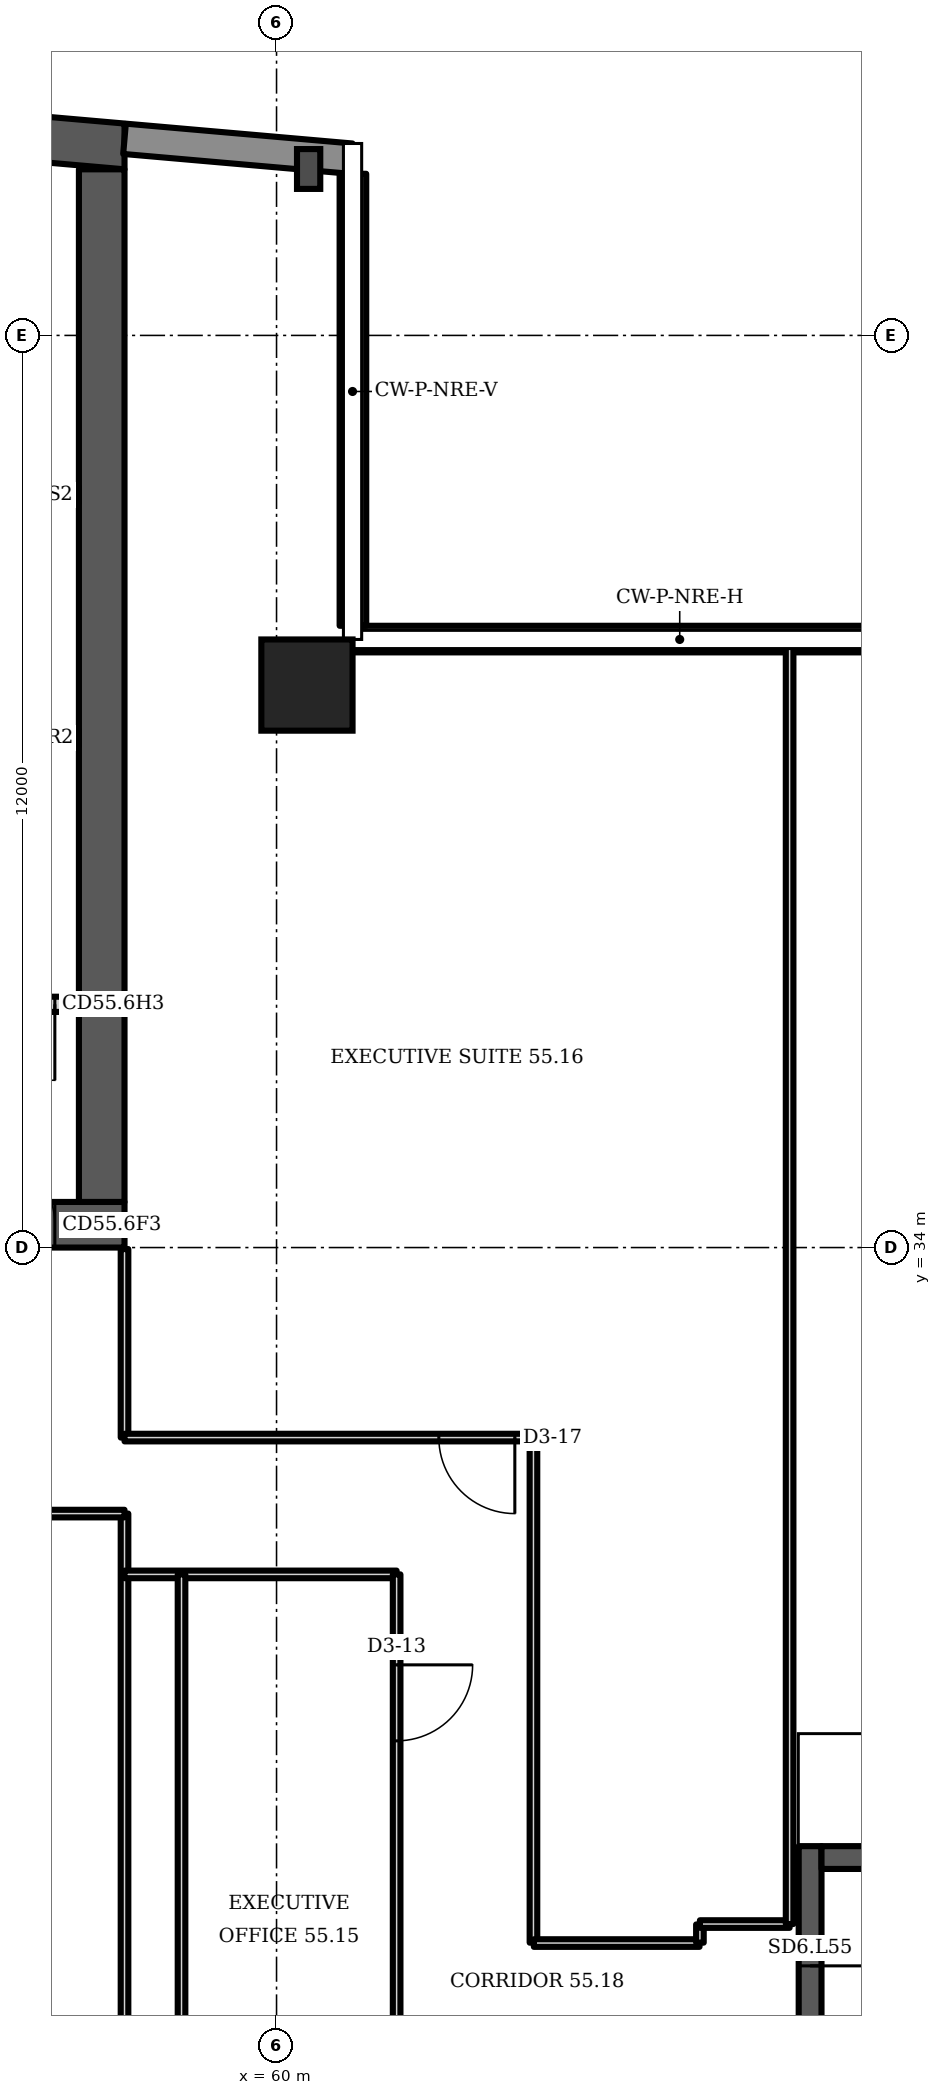
"""IFC4 building model, lengths in metres.
Left out: names, types, materials, properties, quantities, classifications, styles, units other than length and angle.
Written with IfcOpenShell. Run it as: python <this file> out.ifc"""

import sys

from ifc_helpers import new_model, si_unit, direction, frame, frame_2d, origin, origin_2d, place, context, subcontext, project, spatial, polyline, rectangle, i_section, outline, extrude, element, fill, save


model = new_model("IFC4")
c1 = context("Model", 3, precision=1e-05, world=origin(), true_north=direction((0.0, 1.0)))
c2 = subcontext(c1, "Body", "Model", "MODEL_VIEW")
j1 = project(units=[si_unit("LENGTHUNIT", "METRE"), si_unit("PLANEANGLEUNIT", "RADIAN")], contexts=[c1])
p1 = place(None, origin())
s1 = spatial("IfcSite", under=j1, at=p1, CompositionType="ELEMENT")
p2 = place(p1, origin())
s2 = spatial("IfcBuilding", under=s1, at=p2, CompositionType="ELEMENT")
p3 = place(p2, frame((0.0, 0.0, 221.5)))
s3 = spatial("IfcBuildingStorey", under=s2, at=p3, CompositionType="ELEMENT", Elevation=221.5)
p4 = place(p3, origin())
e1 = element("IfcWall", 1, at=p4, inside=s3, PredefinedType="SHEAR", context=c2, shape_type="SweptSolid", body=[
    extrude(outline(polyline([(23.0, 48.185), (40.5, 49.716), (58.0, 48.185), (58.0, 48.787), (40.5, 50.318), (23.0, 48.787), (23.0, 48.185)])), origin(), (0.0, 0.0, 1.0), 3.6),
])
p5 = place(p3, frame((23.0, 34.3, 0.0), z_axis=(0.0, 0.0, 1.0), x_axis=(1.0, 0.0, 0.0)))
e2 = element("IfcWall", 2, at=p5, inside=s3, PredefinedType="SHEAR", context=c2, shape_type="SweptSolid", body=[
    extrude(rectangle(XDim=35.0, YDim=0.6, at=frame_2d((17.5, 0.0))), origin(), (0.0, 0.0, 1.0), 3.6),
])
p6 = place(p5, frame((0.65, 0.0, 0.0)))
e3 = element("IfcOpeningElement", 3, at=p6, cuts=e2, PredefinedType="OPENING", context=c2, shape_type="SweptSolid", body=[
    extrude(rectangle(XDim=1.2, YDim=2.1, at=frame_2d((0.6, 1.05))), frame((0.0, 0.31, 0.0), z_axis=(0.0, -1.0, 0.0), x_axis=(1.0, 0.0, 0.0)), (0.0, 0.0, 1.0), 0.62),
])
p7 = place(p5, frame((7.717, 0.0, 0.0)))
e4 = element("IfcOpeningElement", 4, at=p7, cuts=e2, PredefinedType="OPENING", context=c2, shape_type="SweptSolid", body=[
    extrude(rectangle(XDim=1.1, YDim=2.1, at=frame_2d((0.55, 1.05))), frame((0.0, 0.31, 0.0), z_axis=(0.0, -1.0, 0.0), x_axis=(1.0, 0.0, 0.0)), (0.0, 0.0, 1.0), 0.62),
])
p8 = place(p5, frame((12.183, 0.0, 0.0)))
e5 = element("IfcOpeningElement", 5, at=p8, cuts=e2, PredefinedType="OPENING", context=c2, shape_type="SweptSolid", body=[
    extrude(rectangle(XDim=1.1, YDim=2.1, at=frame_2d((0.55, 1.05))), frame((0.0, 0.31, 0.0), z_axis=(0.0, -1.0, 0.0), x_axis=(1.0, 0.0, 0.0)), (0.0, 0.0, 1.0), 0.62),
])
p9 = place(p5, frame((9.8, 0.0, 0.0)))
e6 = element("IfcOpeningElement", 6, at=p9, cuts=e2, PredefinedType="OPENING", context=c2, shape_type="SweptSolid", body=[
    extrude(rectangle(XDim=1.4, YDim=2.1, at=frame_2d((0.7, 1.05))), frame((0.0, 0.31, 0.0), z_axis=(0.0, -1.0, 0.0), x_axis=(1.0, 0.0, 0.0)), (0.0, 0.0, 1.0), 0.62),
])
p10 = place(p5, frame((14.717, 0.0, 0.0)))
e7 = element("IfcOpeningElement", 7, at=p10, cuts=e2, PredefinedType="OPENING", context=c2, shape_type="SweptSolid", body=[
    extrude(rectangle(XDim=1.1, YDim=2.1, at=frame_2d((0.55, 1.05))), frame((0.0, 0.31, 0.0), z_axis=(0.0, -1.0, 0.0), x_axis=(1.0, 0.0, 0.0)), (0.0, 0.0, 1.0), 0.62),
])
p11 = place(p5, frame((16.95, 0.0, 0.0)))
e8 = element("IfcOpeningElement", 8, at=p11, cuts=e2, PredefinedType="OPENING", context=c2, shape_type="SweptSolid", body=[
    extrude(rectangle(XDim=1.1, YDim=2.1, at=frame_2d((0.55, 1.05))), frame((0.0, 0.31, 0.0), z_axis=(0.0, -1.0, 0.0), x_axis=(1.0, 0.0, 0.0)), (0.0, 0.0, 1.0), 0.62),
])
p12 = place(p5, frame((19.183, 0.0, 0.0)))
e9 = element("IfcOpeningElement", 9, at=p12, cuts=e2, PredefinedType="OPENING", context=c2, shape_type="SweptSolid", body=[
    extrude(rectangle(XDim=1.1, YDim=2.1, at=frame_2d((0.55, 1.05))), frame((0.0, 0.31, 0.0), z_axis=(0.0, -1.0, 0.0), x_axis=(1.0, 0.0, 0.0)), (0.0, 0.0, 1.0), 0.62),
])
p13 = place(p5, frame((26.15, 0.0, 0.0)))
e10 = element("IfcOpeningElement", 10, at=p13, cuts=e2, PredefinedType="OPENING", context=c2, shape_type="SweptSolid", body=[
    extrude(rectangle(XDim=1.2, YDim=2.1, at=frame_2d((0.6, 1.05))), frame((0.0, 0.31, 0.0), z_axis=(0.0, -1.0, 0.0), x_axis=(1.0, 0.0, 0.0)), (0.0, 0.0, 1.0), 0.62),
])
p14 = place(p5, frame((28.767, 0.0, 0.0)))
e11 = element("IfcOpeningElement", 11, at=p14, cuts=e2, PredefinedType="OPENING", context=c2, shape_type="SweptSolid", body=[
    extrude(rectangle(XDim=1.0, YDim=2.1, at=frame_2d((0.5, 1.05))), frame((0.0, 0.31, 0.0), z_axis=(0.0, -1.0, 0.0), x_axis=(1.0, 0.0, 0.0)), (0.0, 0.0, 1.0), 0.62),
])
p15 = place(p5, frame((33.083, 0.0, 0.0)))
e12 = element("IfcOpeningElement", 12, at=p15, cuts=e2, PredefinedType="OPENING", context=c2, shape_type="SweptSolid", body=[
    extrude(rectangle(XDim=1.0, YDim=2.1, at=frame_2d((0.5, 1.05))), frame((0.0, 0.31, 0.0), z_axis=(0.0, -1.0, 0.0), x_axis=(1.0, 0.0, 0.0)), (0.0, 0.0, 1.0), 0.62),
])
p16 = place(p5, frame((30.8, 0.0, 0.0)))
e13 = element("IfcOpeningElement", 13, at=p16, cuts=e2, PredefinedType="OPENING", context=c2, shape_type="SweptSolid", body=[
    extrude(rectangle(XDim=1.4, YDim=2.1, at=frame_2d((0.7, 1.05))), frame((0.0, 0.31, 0.0), z_axis=(0.0, -1.0, 0.0), x_axis=(1.0, 0.0, 0.0)), (0.0, 0.0, 1.0), 0.62),
])
p17 = place(p3, frame((57.7, 34.6, 0.0), z_axis=(0.0, 0.0, 1.0), x_axis=(0.0, 1.0, 0.0)))
e14 = element("IfcWall", 14, at=p17, inside=s3, PredefinedType="SHEAR", context=c2, shape_type="SweptSolid", body=[
    extrude(rectangle(XDim=13.585, YDim=0.6, at=frame_2d((6.792, 0.0))), origin(), (0.0, 0.0, 1.0), 3.6),
])
p18 = place(p3, frame((60.4, 41.4, 0.0), z_axis=(0.0, 0.0, 1.0), x_axis=(1.0, 0.0, 0.0)))
e15 = element("IfcColumn", 15, at=p18, inside=s3, PredefinedType="COLUMN", context=c2, shape_type="SweptSolid", body=[
    extrude(rectangle(XDim=1.2, YDim=1.2, at=origin_2d()), origin(), (0.0, 0.0, 1.0), 3.6),
])
p19 = place(p3, frame((60.422, 48.189, 0.0), z_axis=(0.0, 0.0, 1.0), x_axis=(1.0, 0.0, 0.0)))
e16 = element("IfcColumn", 16, at=p19, inside=s3, PredefinedType="COLUMN", context=c2, shape_type="SweptSolid", body=[
    extrude(i_section(OverallWidth=0.306, OverallDepth=0.524, WebThickness=0.021, FlangeThickness=0.04, FilletRadius=0.027, at=origin_2d()), origin(), (0.0, 0.0, 1.0), 3.6),
])
p20 = place(p3, frame((60.983, 48.326, 0.0), z_axis=(0.0, 0.0, 1.0), x_axis=(-0.996194, 0.087168, 0.0)))
e17 = element("IfcWall", 17, at=p20, inside=s3, PredefinedType="SOLIDWALL", context=c2, shape_type="SweptSolid", body=[
    extrude(rectangle(XDim=2.994, YDim=0.4, at=frame_2d((1.497, 0.0))), origin(), (0.0, 0.0, 1.0), 3.2),
])
p21 = place(p3, frame((68.803, 42.005, 0.0), z_axis=(0.0, 0.0, 1.0), x_axis=(-1.0, 0.0, 0.0)))
e18 = element("IfcWall", 18, at=p21, inside=s3, PredefinedType="SOLIDWALL", context=c2, shape_type="SweptSolid", body=[
    extrude(rectangle(XDim=7.803, YDim=0.35, at=frame_2d((3.902, 0.0))), origin(), (0.0, 0.0, 1.0), 1.0),
])
p22 = place(p3, frame((61.005, 42.18, 0.0), z_axis=(0.0, 0.0, 1.0), x_axis=(0.0, 1.0, 0.0)))
e19 = element("IfcWall", 19, at=p22, inside=s3, PredefinedType="SOLIDWALL", context=c2, shape_type="SweptSolid", body=[
    extrude(rectangle(XDim=5.947, YDim=0.35, at=frame_2d((2.973, 0.0))), origin(), (0.0, 0.0, 1.0), 1.0),
])
p23 = place(p3, frame((55.767, 37.2, 0.0), z_axis=(0.0, 0.0, 1.0), x_axis=(1.0, 0.0, 0.0)))
e20 = element("IfcWall", 20, at=p23, inside=s3, PredefinedType="PARTITIONING", context=c2, shape_type="SweptSolid", body=[
    extrude(rectangle(XDim=1.633, YDim=0.2, at=frame_2d((0.817, 0.0))), origin(), (0.0, 0.0, 1.0), 3.2),
])
p24 = place(p23, frame((0.317, 0.0, 0.0)))
e21 = element("IfcOpeningElement", 21, at=p24, cuts=e20, PredefinedType="OPENING", context=c2, shape_type="SweptSolid", body=[
    extrude(rectangle(XDim=1.0, YDim=2.1, at=frame_2d((0.5, 1.05))), frame((0.0, 0.11, 0.0), z_axis=(0.0, -1.0, 0.0), x_axis=(1.0, 0.0, 0.0)), (0.0, 0.0, 1.0), 0.22),
])
p25 = place(p3, frame((51.3, 40.7, 0.0), z_axis=(0.0, 0.0, 1.0), x_axis=(1.0, 0.0, 0.0)))
e22 = element("IfcWall", 22, at=p25, inside=s3, PredefinedType="PARTITIONING", context=c2, shape_type="SweptSolid", body=[
    extrude(rectangle(XDim=6.1, YDim=0.2, at=frame_2d((3.05, 0.0))), origin(), (0.0, 0.0, 1.0), 3.2),
])
p26 = place(p25, frame((0.417, 0.0, 0.0)))
e23 = element("IfcOpeningElement", 23, at=p26, cuts=e22, PredefinedType="OPENING", context=c2, shape_type="SweptSolid", body=[
    extrude(rectangle(XDim=1.1, YDim=2.1, at=frame_2d((0.55, 1.05))), frame((0.0, 0.11, 0.0), z_axis=(0.0, -1.0, 0.0), x_axis=(1.0, 0.0, 0.0)), (0.0, 0.0, 1.0), 0.22),
])
p27 = place(p25, frame((3.617, 0.0, 0.0)))
e24 = element("IfcOpeningElement", 24, at=p27, cuts=e22, PredefinedType="OPENING", context=c2, shape_type="SweptSolid", body=[
    extrude(rectangle(XDim=1.0, YDim=2.1, at=frame_2d((0.5, 1.05))), frame((0.0, 0.11, 0.0), z_axis=(0.0, -1.0, 0.0), x_axis=(1.0, 0.0, 0.0)), (0.0, 0.0, 1.0), 0.22),
])
p28 = place(p3, frame((51.3, 43.9, 0.0), z_axis=(0.0, 0.0, 1.0), x_axis=(1.0, 0.0, 0.0)))
e25 = element("IfcWall", 25, at=p28, inside=s3, PredefinedType="PARTITIONING", context=c2, shape_type="SweptSolid", body=[
    extrude(rectangle(XDim=6.1, YDim=0.2, at=frame_2d((3.05, 0.0))), origin(), (0.0, 0.0, 1.0), 3.2),
])
p29 = place(p28, frame((3.617, 0.0, 0.0)))
e26 = element("IfcOpeningElement", 26, at=p29, cuts=e25, PredefinedType="OPENING", context=c2, shape_type="SweptSolid", body=[
    extrude(rectangle(XDim=1.0, YDim=2.1, at=frame_2d((0.5, 1.05))), frame((0.0, 0.11, 0.0), z_axis=(0.0, -1.0, 0.0), x_axis=(1.0, 0.0, 0.0)), (0.0, 0.0, 1.0), 0.22),
])
p30 = place(p3, frame((67.02, 21.775, 0.0), z_axis=(0.0, 0.0, 1.0), x_axis=(0.0, 1.0, 0.0)))
e27 = element("IfcWall", 27, at=p30, inside=s3, PredefinedType="SHEAR", context=c2, shape_type="SweptSolid", body=[
    extrude(rectangle(XDim=4.35, YDim=0.3, at=frame_2d((2.175, 0.0))), origin(), (0.0, 0.0, 1.0), 3.2),
])
p31 = place(p30, frame((1.575, 0.0, 0.0)))
e28 = element("IfcOpeningElement", 28, at=p31, cuts=e27, PredefinedType="OPENING", context=c2, shape_type="SweptSolid", body=[
    extrude(rectangle(XDim=1.2, YDim=2.1, at=frame_2d((0.6, 1.05))), frame((0.0, 0.16, 0.0), z_axis=(0.0, -1.0, 0.0), x_axis=(1.0, 0.0, 0.0)), (0.0, 0.0, 1.0), 0.32),
])
p32 = place(p3, frame((58.0, 17.0, 0.0), z_axis=(0.0, 0.0, 1.0), x_axis=(0.0, 1.0, 0.0)))
e29 = element("IfcWall", 29, at=p32, inside=s3, PredefinedType="PARTITIONING", context=c2, shape_type="SweptSolid", body=[
    extrude(rectangle(XDim=13.5, YDim=0.1, at=frame_2d((6.75, 0.0))), origin(), (0.0, 0.0, 1.0), 3.2),
])
p33 = place(p3, frame((58.0, 29.7, 0.0), z_axis=(0.0, 0.0, 1.0), x_axis=(1.0, 0.0, 0.0)))
e30 = element("IfcWall", 30, at=p33, inside=s3, PredefinedType="PARTITIONING", context=c2, shape_type="SweptSolid", body=[
    extrude(rectangle(XDim=3.58, YDim=0.1, at=frame_2d((1.79, 0.0))), origin(), (0.0, 0.0, 1.0), 3.2),
])
p34 = place(p3, frame((58.0, 31.5, 0.0), z_axis=(0.0, 0.0, 1.0), x_axis=(0.0, 1.0, 0.0)))
e31 = element("IfcWall", 31, at=p34, inside=s3, PredefinedType="PARTITIONING", context=c2, shape_type="SweptSolid", body=[
    extrude(rectangle(XDim=2.48, YDim=0.1, at=frame_2d((1.24, 0.0))), origin(), (0.0, 0.0, 1.0), 3.2),
])
p35 = place(p3, frame((58.0, 31.5, 0.0), z_axis=(0.0, 0.0, 1.0), x_axis=(1.0, 0.0, 0.0)))
e32 = element("IfcWall", 32, at=p35, inside=s3, PredefinedType="PARTITIONING", context=c2, shape_type="SweptSolid", body=[
    extrude(rectangle(XDim=5.38, YDim=0.1, at=frame_2d((2.69, 0.0))), origin(), (0.0, 0.0, 1.0), 3.2),
])
p36 = place(p35, frame((4.135, 0.0, 0.0)))
e33 = element("IfcOpeningElement", 33, at=p36, cuts=e32, PredefinedType="OPENING", context=c2, shape_type="SweptSolid", body=[
    extrude(rectangle(XDim=1.0, YDim=2.1, at=frame_2d((0.5, 1.05))), frame((0.0, 0.06, 0.0), z_axis=(0.0, -1.0, 0.0), x_axis=(1.0, 0.0, 0.0)), (0.0, 0.0, 1.0), 0.12),
])
p37 = place(p3, frame((58.75, 23.35, 0.0), z_axis=(0.0, 0.0, 1.0), x_axis=(0.0, 1.0, 0.0)))
e34 = element("IfcWall", 34, at=p37, inside=s3, PredefinedType="PARTITIONING", context=c2, shape_type="SweptSolid", body=[
    extrude(rectangle(XDim=6.35, YDim=0.1, at=frame_2d((3.175, 0.0))), origin(), (0.0, 0.0, 1.0), 3.2),
])
p38 = place(p3, frame((61.58, 4.88, 0.0), z_axis=(0.0, 0.0, 1.0), x_axis=(0.0, 1.0, 0.0)))
e35 = element("IfcWall", 35, at=p38, inside=s3, PredefinedType="PARTITIONING", context=c2, shape_type="SweptSolid", body=[
    extrude(rectangle(XDim=24.82, YDim=0.1, at=frame_2d((12.41, 0.0))), origin(), (0.0, 0.0, 1.0), 3.2),
])
p39 = place(p38, frame((1.24, 0.0, 0.0)))
e36 = element("IfcOpeningElement", 36, at=p39, cuts=e35, PredefinedType="OPENING", context=c2, shape_type="SweptSolid", body=[
    extrude(rectangle(XDim=1.0, YDim=2.1, at=frame_2d((0.5, 1.05))), frame((0.0, 0.06, 0.0), z_axis=(0.0, -1.0, 0.0), x_axis=(1.0, 0.0, 0.0)), (0.0, 0.0, 1.0), 0.12),
])
p40 = place(p38, frame((5.09, 0.0, 0.0)))
e37 = element("IfcOpeningElement", 37, at=p40, cuts=e35, PredefinedType="OPENING", context=c2, shape_type="SweptSolid", body=[
    extrude(rectangle(XDim=1.0, YDim=2.1, at=frame_2d((0.5, 1.05))), frame((0.0, 0.06, 0.0), z_axis=(0.0, -1.0, 0.0), x_axis=(1.0, 0.0, 0.0)), (0.0, 0.0, 1.0), 0.12),
])
p41 = place(p38, frame((9.415, 0.0, 0.0)))
e38 = element("IfcOpeningElement", 38, at=p41, cuts=e35, PredefinedType="OPENING", context=c2, shape_type="SweptSolid", body=[
    extrude(rectangle(XDim=1.0, YDim=2.1, at=frame_2d((0.5, 1.05))), frame((0.0, 0.06, 0.0), z_axis=(0.0, -1.0, 0.0), x_axis=(1.0, 0.0, 0.0)), (0.0, 0.0, 1.0), 0.12),
])
p42 = place(p38, frame((14.85, 0.0, 0.0)))
e39 = element("IfcOpeningElement", 39, at=p42, cuts=e35, PredefinedType="OPENING", context=c2, shape_type="SweptSolid", body=[
    extrude(rectangle(XDim=1.0, YDim=2.1, at=frame_2d((0.5, 1.05))), frame((0.0, 0.06, 0.0), z_axis=(0.0, -1.0, 0.0), x_axis=(1.0, 0.0, 0.0)), (0.0, 0.0, 1.0), 0.12),
])
p43 = place(p38, frame((22.63, 0.0, 0.0)))
e40 = element("IfcOpeningElement", 40, at=p43, cuts=e35, PredefinedType="OPENING", context=c2, shape_type="SweptSolid", body=[
    extrude(rectangle(XDim=1.0, YDim=2.1, at=frame_2d((0.5, 1.05))), frame((0.0, 0.06, 0.0), z_axis=(0.0, -1.0, 0.0), x_axis=(1.0, 0.0, 0.0)), (0.0, 0.0, 1.0), 0.12),
])
p44 = place(p3, frame((63.38, 24.855, 0.0), z_axis=(0.0, 0.0, 1.0), x_axis=(0.0, 1.0, 0.0)))
e41 = element("IfcWall", 41, at=p44, inside=s3, PredefinedType="PARTITIONING", context=c2, shape_type="SweptSolid", body=[
    extrude(rectangle(XDim=6.645, YDim=0.1, at=frame_2d((3.323, 0.0))), origin(), (0.0, 0.0, 1.0), 3.2),
])
p45 = place(p3, frame((63.385, 24.85, 0.0), z_axis=(0.0, 0.0, 1.0), x_axis=(1.0, 0.0, 0.0)))
e42 = element("IfcWall", 42, at=p45, inside=s3, PredefinedType="PARTITIONING", context=c2, shape_type="SweptSolid", body=[
    extrude(rectangle(XDim=2.18, YDim=0.1, at=frame_2d((1.09, 0.0))), origin(), (0.0, 0.0, 1.0), 3.2),
])
p46 = place(p3, frame((65.57, 24.855, 0.0), z_axis=(0.0, 0.0, 1.0), x_axis=(0.0, 1.0, 0.0)))
e43 = element("IfcWall", 43, at=p46, inside=s3, PredefinedType="PARTITIONING", context=c2, shape_type="SweptSolid", body=[
    extrude(rectangle(XDim=0.24, YDim=0.1, at=frame_2d((0.12, 0.0))), origin(), (0.0, 0.0, 1.0), 3.2),
])
p47 = place(p3, frame((65.57, 25.1, 0.0), z_axis=(0.0, 0.0, 1.0), x_axis=(1.0, 0.0, 0.0)))
e44 = element("IfcWall", 44, at=p47, inside=s3, PredefinedType="PARTITIONING", context=c2, shape_type="SweptSolid", body=[
    extrude(rectangle(XDim=1.18, YDim=0.1, at=frame_2d((0.59, 0.0))), origin(), (0.0, 0.0, 1.0), 3.2),
])
p48 = place(p3, frame((66.75, 25.1, 0.0), z_axis=(0.0, 0.0, 1.0), x_axis=(0.0, 1.0, 0.0)))
e45 = element("IfcWall", 45, at=p48, inside=s3, PredefinedType="PARTITIONING", context=c2, shape_type="SweptSolid", body=[
    extrude(rectangle(XDim=16.88, YDim=0.1, at=frame_2d((8.44, 0.0))), origin(), (0.0, 0.0, 1.0), 3.2),
])
p49 = place(p3, frame((44.15, 30.5, 0.0), z_axis=(0.0, 0.0, 1.0), x_axis=(1.0, 0.0, 0.0)))
e46 = element("IfcWall", 46, at=p49, inside=s3, PredefinedType="PARTITIONING", context=c2, shape_type="SweptSolid", body=[
    extrude(rectangle(XDim=13.85, YDim=0.1, at=frame_2d((6.925, 0.0))), origin(), (0.0, 0.0, 1.0), 3.2),
])
p50 = place(p49, frame((6.77, 0.0, 0.0)))
e47 = element("IfcOpeningElement", 47, at=p50, cuts=e46, PredefinedType="OPENING", context=c2, shape_type="SweptSolid", body=[
    extrude(rectangle(XDim=1.0, YDim=2.1, at=frame_2d((0.5, 1.05))), frame((0.0, 0.06, 0.0), z_axis=(0.0, -1.0, 0.0), x_axis=(1.0, 0.0, 0.0)), (0.0, 0.0, 1.0), 0.12),
])
p51 = place(p3, frame((67.17, 25.975, 0.0), z_axis=(0.0, 0.0, 1.0), x_axis=(1.0, 0.0, 0.0)))
e48 = element("IfcWall", 48, at=p51, inside=s3, PredefinedType="SHEAR", context=c2, shape_type="SweptSolid", body=[
    extrude(rectangle(XDim=7.5, YDim=0.3, at=frame_2d((3.75, 0.0))), origin(), (0.0, 0.0, 1.0), 3.2),
])
p52 = place(p15, origin())
e49 = element("IfcDoor", 49, at=p52, inside=s3, OperationType="SINGLE_SWING_LEFT", PredefinedType="DOOR", context=c2, shape_type="SweptSolid", body=[
    extrude(rectangle(XDim=1.0, YDim=2.1, at=frame_2d((0.5, 1.05))), frame((0.0, 0.025, 0.0), z_axis=(0.0, -1.0, 0.0), x_axis=(1.0, 0.0, 0.0)), (0.0, 0.0, 1.0), 0.05),
])
fill(e12, e49)
p53 = place(p24, origin())
e50 = element("IfcDoor", 50, at=p53, inside=s3, OperationType="SINGLE_SWING_RIGHT", PredefinedType="DOOR", context=c2, shape_type="SweptSolid", body=[
    extrude(rectangle(XDim=1.0, YDim=2.1, at=frame_2d((0.5, 1.05))), frame((0.0, 0.025, 0.0), z_axis=(0.0, -1.0, 0.0), x_axis=(1.0, 0.0, 0.0)), (0.0, 0.0, 1.0), 0.05),
])
fill(e21, e50)
p54 = place(p31, origin())
e51 = element("IfcDoor", 51, at=p54, inside=s3, OperationType="SINGLE_SWING_RIGHT", PredefinedType="DOOR", context=c2, shape_type="SweptSolid", body=[
    extrude(rectangle(XDim=1.2, YDim=2.1, at=frame_2d((0.6, 1.05))), frame((0.0, 0.025, 0.0), z_axis=(0.0, -1.0, 0.0), x_axis=(1.0, 0.0, 0.0)), (0.0, 0.0, 1.0), 0.05),
])
fill(e28, e51)
p55 = place(p43, origin())
e52 = element("IfcDoor", 52, at=p55, inside=s3, OperationType="SINGLE_SWING_RIGHT", PredefinedType="DOOR", context=c2, shape_type="SweptSolid", body=[
    extrude(rectangle(XDim=1.0, YDim=2.1, at=frame_2d((0.5, 1.05))), frame((0.0, 0.025, 0.0), z_axis=(0.0, -1.0, 0.0), x_axis=(1.0, 0.0, 0.0)), (0.0, 0.0, 1.0), 0.05),
])
fill(e40, e52)
p56 = place(p36, origin())
e53 = element("IfcDoor", 53, at=p56, inside=s3, OperationType="SINGLE_SWING_RIGHT", PredefinedType="DOOR", context=c2, shape_type="SweptSolid", body=[
    extrude(rectangle(XDim=1.0, YDim=2.1, at=frame_2d((0.5, 1.05))), frame((0.0, 0.025, 0.0), z_axis=(0.0, -1.0, 0.0), x_axis=(1.0, 0.0, 0.0)), (0.0, 0.0, 1.0), 0.05),
])
fill(e33, e53)
save(model, sys.argv[1])
